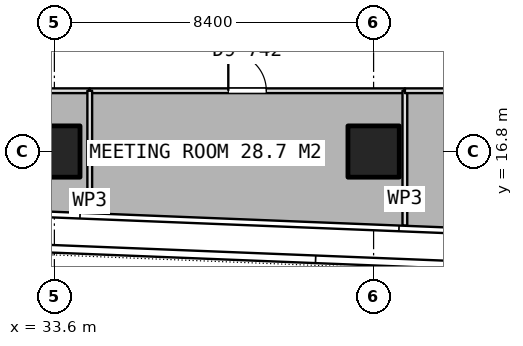
"""IFC4 building model, lengths in metres.
Left out: names, types, materials, properties, quantities, classifications, styles, units other than length and angle.
Written with IfcOpenShell. Run it as: python <this file> out.ifc"""

import sys

from ifc_helpers import new_model, si_unit, direction, frame, frame_2d, origin, origin_2d, place, context, subcontext, project, spatial, rectangle, extrude, element, fill, save


model = new_model("IFC4")
c1 = context("Model", 3, precision=1e-05, world=origin(), true_north=direction((0.0, 1.0)))
c2 = subcontext(c1, "Body", "Model", "MODEL_VIEW")
j1 = project(units=[si_unit("LENGTHUNIT", "METRE"), si_unit("PLANEANGLEUNIT", "RADIAN")], contexts=[c1])
p1 = place(None, origin())
s1 = spatial("IfcSite", under=j1, at=p1, CompositionType="ELEMENT")
p2 = place(p1, origin())
s2 = spatial("IfcBuilding", under=s1, at=p2, CompositionType="ELEMENT")
p3 = place(p2, frame((0.0, 0.0, 187.7)))
s3 = spatial("IfcBuildingStorey", under=s2, at=p3, CompositionType="ELEMENT", Elevation=187.7)
for number, where, z_axis, x_axis in (
    (1, (33.6, 16.8, 0.0), (0.0, 0.0, 1.0), (1.0, 0.0, 0.0)),
    (2, (42.0, 16.8, 0.0), (0.0, 0.0, 1.0), (1.0, 0.0, 0.0)),
):
    element("IfcColumn", number, at=place(p3, frame(where, z_axis=z_axis, x_axis=x_axis)), inside=s3, PredefinedType="COLUMN", context=c2, shape_type="SweptSolid", body=[
        extrude(rectangle(XDim=1.35, YDim=1.35, at=origin_2d()), origin(), (0.0, 0.0, 1.0), 3.75),
    ])
p4 = place(p3, frame((34.531, 18.4, 0.0), z_axis=(0.0, 0.0, 1.0), x_axis=(1.0, 0.0, 0.0)))
e3 = element("IfcWall", 3, at=p4, inside=s3, PredefinedType="PARTITIONING", context=c2, shape_type="SweptSolid", body=[
    extrude(rectangle(XDim=8.292, YDim=0.125, at=frame_2d((4.146, 0.0))), origin(), (0.0, 0.0, 1.0), 3.5),
])
p5 = place(p4, frame((3.646, 0.0, 0.0)))
e4 = element("IfcOpeningElement", 4, at=p5, cuts=e3, PredefinedType="OPENING", context=c2, shape_type="SweptSolid", body=[
    extrude(rectangle(XDim=1.0, YDim=2.1, at=frame_2d((0.5, 1.05))), frame((0.0, 0.073, 0.0), z_axis=(0.0, -1.0, 0.0), x_axis=(1.0, 0.0, 0.0)), (0.0, 0.0, 1.0), 0.145),
])
p6 = place(p3, frame((42.823, 18.4, 0.0), z_axis=(0.0, 0.0, 1.0), x_axis=(0.0, -1.0, 0.0)))
e5 = element("IfcWall", 5, at=p6, inside=s3, PredefinedType="PARTITIONING", context=c2, shape_type="SweptSolid", body=[
    extrude(rectangle(XDim=3.549, YDim=0.125, at=frame_2d((1.774, 0.0))), origin(), (0.0, 0.0, 1.0), 3.5),
])
p7 = place(p3, frame((34.531, 15.182, 0.0), z_axis=(0.0, 0.0, 1.0), x_axis=(0.0, 1.0, 0.0)))
e6 = element("IfcWall", 6, at=p7, inside=s3, PredefinedType="PARTITIONING", context=c2, shape_type="SweptSolid", body=[
    extrude(rectangle(XDim=3.218, YDim=0.125, at=frame_2d((1.609, 0.0))), origin(), (0.0, 0.0, 1.0), 3.5),
])
p8 = place(p3, frame((42.824, 18.4, 0.0), z_axis=(0.0, 0.0, 1.0), x_axis=(1.0, 0.0, 0.0)))
e7 = element("IfcWall", 7, at=p8, inside=s3, PredefinedType="PARTITIONING", context=c2, shape_type="SweptSolid", body=[
    extrude(rectangle(XDim=8.466, YDim=0.125, at=frame_2d((4.233, 0.0))), origin(), (0.0, 0.0, 1.0), 3.5),
])
p9 = place(p8, frame((3.733, 0.0, 0.0)))
e8 = element("IfcOpeningElement", 8, at=p9, cuts=e7, PredefinedType="OPENING", context=c2, shape_type="SweptSolid", body=[
    extrude(rectangle(XDim=1.0, YDim=2.1, at=frame_2d((0.5, 1.05))), frame((0.0, 0.073, 0.0), z_axis=(0.0, -1.0, 0.0), x_axis=(1.0, 0.0, 0.0)), (0.0, 0.0, 1.0), 0.145),
])
p10 = place(p3, frame((26.058, 18.4, 0.0), z_axis=(0.0, 0.0, 1.0), x_axis=(1.0, 0.0, 0.0)))
e9 = element("IfcWall", 9, at=p10, inside=s3, PredefinedType="PARTITIONING", context=c2, shape_type="SweptSolid", body=[
    extrude(rectangle(XDim=8.472, YDim=0.125, at=frame_2d((4.236, 0.0))), origin(), (0.0, 0.0, 1.0), 3.5),
])
p11 = place(p10, frame((3.736, 0.0, 0.0)))
e10 = element("IfcOpeningElement", 10, at=p11, cuts=e9, PredefinedType="OPENING", context=c2, shape_type="SweptSolid", body=[
    extrude(rectangle(XDim=1.0, YDim=2.1, at=frame_2d((0.5, 1.05))), frame((0.0, 0.073, 0.0), z_axis=(0.0, -1.0, 0.0), x_axis=(1.0, 0.0, 0.0)), (0.0, 0.0, 1.0), 0.145),
])
p12 = place(p5, origin())
e11 = element("IfcDoor", 11, at=p12, inside=s3, OperationType="SINGLE_SWING_LEFT", PredefinedType="DOOR", context=c2, shape_type="SweptSolid", body=[
    extrude(rectangle(XDim=1.0, YDim=2.1, at=frame_2d((0.5, 1.05))), frame((0.0, 0.025, 0.0), z_axis=(0.0, -1.0, 0.0), x_axis=(1.0, 0.0, 0.0)), (0.0, 0.0, 1.0), 0.05),
])
fill(e4, e11)
save(model, sys.argv[1])
